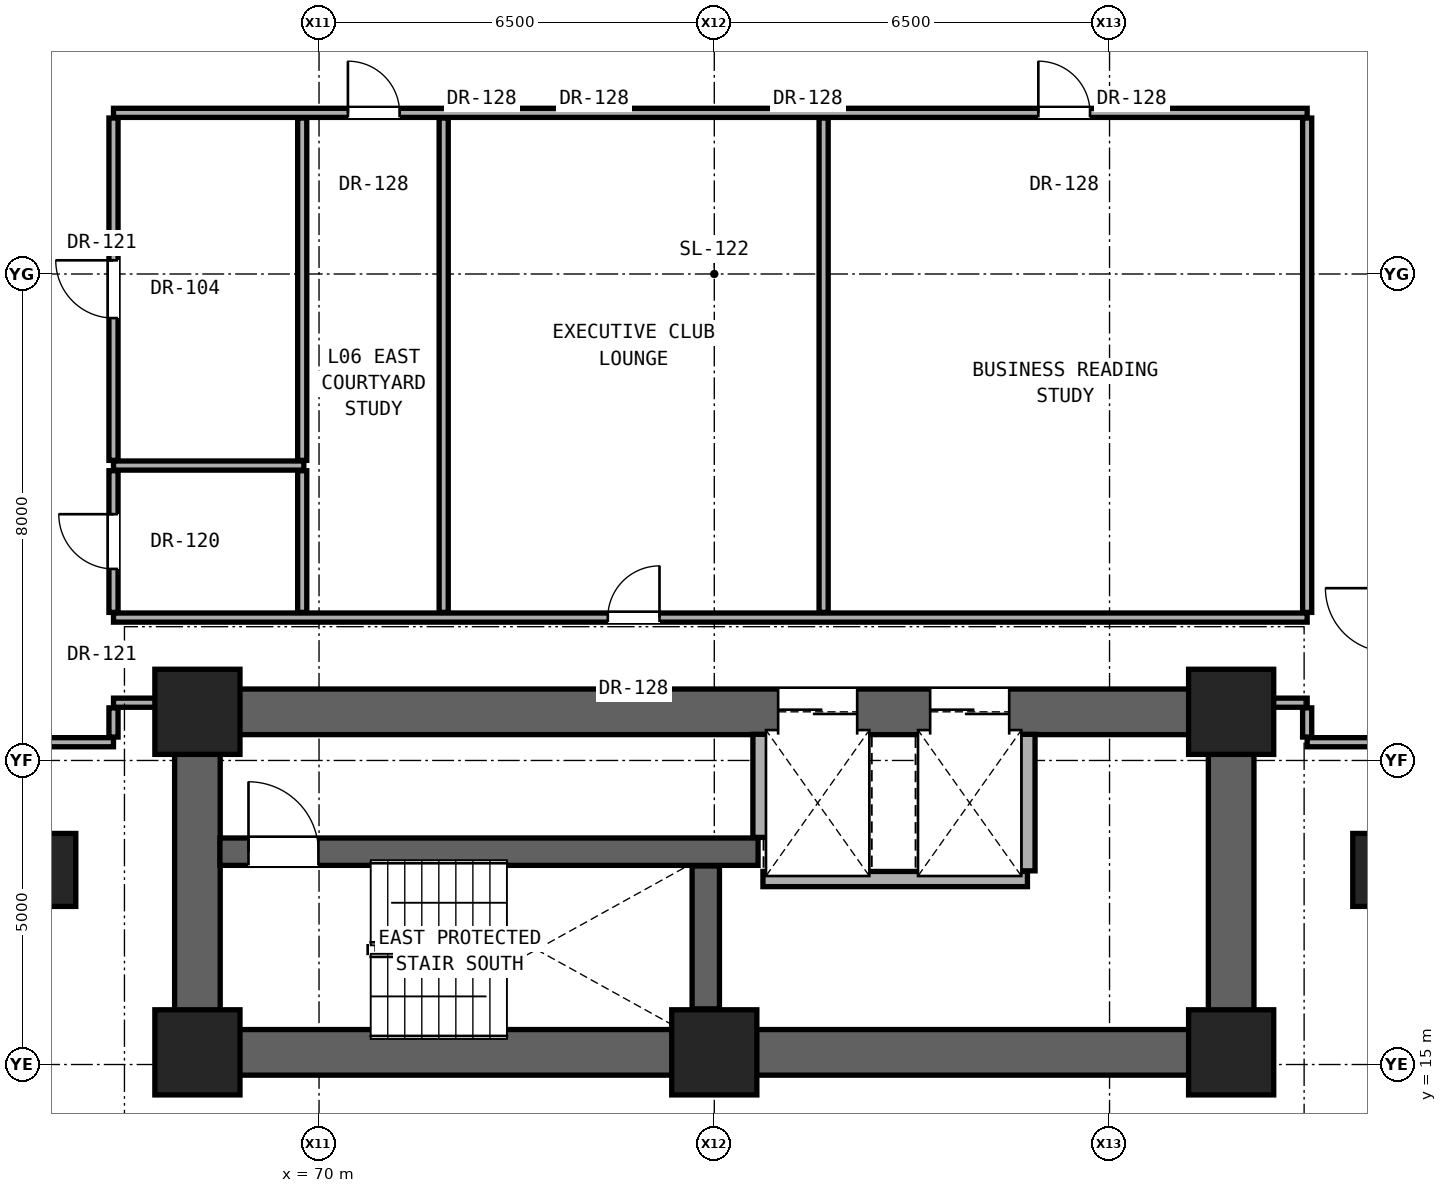
"""IFC4 building model, lengths in metres.
Left out: names, types, materials, properties, quantities, classifications, styles, units other than length and angle.
Written with IfcOpenShell. Run it as: python <this file> out.ifc"""

import sys

from ifc_helpers import new_model, si_unit, direction, frame, frame_2d, origin, origin_2d, place, context, subcontext, project, spatial, rectangle, extrude, element, fill, save


model = new_model("IFC4")
c1 = context("Model", 3, precision=1e-05, world=origin(), true_north=direction((0.0, 1.0)))
c2 = subcontext(c1, "Body", "Model", "MODEL_VIEW")
j1 = project(units=[si_unit("LENGTHUNIT", "METRE"), si_unit("PLANEANGLEUNIT", "RADIAN")], contexts=[c1])
p1 = place(None, origin())
s1 = spatial("IfcSite", under=j1, at=p1, CompositionType="ELEMENT")
p2 = place(p1, origin())
s2 = spatial("IfcBuilding", under=s1, at=p2, CompositionType="ELEMENT")
p3 = place(p2, frame((0.0, 0.0, 25.7)))
s3 = spatial("IfcBuildingStorey", under=s2, at=p3, CompositionType="ELEMENT", Elevation=25.7)
for number, where, z_axis, x_axis in (
    (1, (68.0, 15.2, 0.0), (0.0, 0.0, 1.0), (1.0, 0.0, 0.0)),
    (2, (76.5, 15.2, 0.0), (0.0, 0.0, 1.0), (1.0, 0.0, 0.0)),
    (3, (85.0, 15.2, 0.0), (0.0, 0.0, 1.0), (1.0, 0.0, 0.0)),
    (4, (68.0, 20.8, 0.0), (0.0, 0.0, 1.0), (1.0, 0.0, 0.0)),
    (5, (85.0, 20.8, 0.0), (0.0, 0.0, 1.0), (1.0, 0.0, 0.0)),
):
    element("IfcColumn", number, at=place(p3, frame(where, z_axis=z_axis, x_axis=x_axis)), inside=s3, PredefinedType="COLUMN", context=c2, shape_type="SweptSolid", body=[
        extrude(rectangle(XDim=1.4, YDim=1.4, at=origin_2d()), origin(), (0.0, 0.0, 1.0), 3.3),
    ])
for number, where, z_axis, x_axis in (
    (6, (65.6, 18.2, 0.0), (0.0, 0.0, 1.0), (1.0, 0.0, 0.0)),
    (7, (87.4, 18.2, 0.0), (0.0, 0.0, 1.0), (1.0, 0.0, 0.0)),
):
    element("IfcColumn", number, at=place(p3, frame(where, z_axis=z_axis, x_axis=x_axis)), inside=s3, PredefinedType="PILASTER", context=c2, shape_type="SweptSolid", body=[
        extrude(rectangle(XDim=0.8, YDim=1.2, at=origin_2d()), origin(), (0.0, 0.0, 1.0), 3.3),
    ])
p4 = place(p3, frame((68.0, 15.2, 0.0), z_axis=(0.0, 0.0, 1.0), x_axis=(1.0, 0.0, 0.0)))
e8 = element("IfcWall", 8, at=p4, inside=s3, PredefinedType="SHEAR", context=c2, shape_type="SweptSolid", body=[
    extrude(rectangle(XDim=17.0, YDim=0.75, at=frame_2d((8.5, 0.0))), origin(), (0.0, 0.0, 1.0), 3.06),
])
for number, where, z_axis, x_axis in (
    (9, (68.0, 15.2, 0.0), (0.0, 0.0, 1.0), (0.0, 1.0, 0.0)),
    (10, (85.0, 15.2, 0.0), (0.0, 0.0, 1.0), (0.0, 1.0, 0.0)),
):
    element("IfcWall", number, at=place(p3, frame(where, z_axis=z_axis, x_axis=x_axis)), inside=s3, PredefinedType="SHEAR", context=c2, shape_type="SweptSolid", body=[
        extrude(rectangle(XDim=5.6, YDim=0.75, at=frame_2d((2.8, 0.0))), origin(), (0.0, 0.0, 1.0), 3.06),
    ])
p5 = place(p3, frame((68.0, 20.8, 0.0), z_axis=(0.0, 0.0, 1.0), x_axis=(1.0, 0.0, 0.0)))
e11 = element("IfcWall", 11, at=p5, inside=s3, PredefinedType="SHEAR", context=c2, shape_type="SweptSolid", body=[
    extrude(rectangle(XDim=17.0, YDim=0.75, at=frame_2d((8.5, 0.0))), origin(), (0.0, 0.0, 1.0), 3.06),
])
p6 = place(p5, frame((9.55, 0.0, 0.0)))
e12 = element("IfcOpeningElement", 12, at=p6, cuts=e11, PredefinedType="OPENING", context=c2, shape_type="SweptSolid", body=[
    extrude(rectangle(XDim=1.3, YDim=2.3, at=frame_2d((0.65, 1.15))), frame((0.0, 0.385, 0.0), z_axis=(0.0, -1.0, 0.0), x_axis=(1.0, 0.0, 0.0)), (0.0, 0.0, 1.0), 0.77),
])
p7 = place(p5, frame((12.05, 0.0, 0.0)))
e13 = element("IfcOpeningElement", 13, at=p7, cuts=e11, PredefinedType="OPENING", context=c2, shape_type="SweptSolid", body=[
    extrude(rectangle(XDim=1.3, YDim=2.3, at=frame_2d((0.65, 1.15))), frame((0.0, 0.385, 0.0), z_axis=(0.0, -1.0, 0.0), x_axis=(1.0, 0.0, 0.0)), (0.0, 0.0, 1.0), 0.77),
])
p8 = place(p3, frame((77.3, 18.05, 0.0), z_axis=(0.0, 0.0, 1.0), x_axis=(1.0, 0.0, 0.0)))
e14 = element("IfcWall", 14, at=p8, inside=s3, PredefinedType="SOLIDWALL", context=c2, shape_type="SweptSolid", body=[
    extrude(rectangle(XDim=4.35, YDim=0.25, at=frame_2d((2.175, 0.0))), origin(), (0.0, 0.0, 1.0), 3.06),
])
p9 = place(p3, frame((68.37, 18.5, 0.0), z_axis=(0.0, 0.0, 1.0), x_axis=(1.0, 0.0, 0.0)))
e15 = element("IfcWall", 15, at=p9, inside=s3, PredefinedType="SHEAR", context=c2, shape_type="SweptSolid", body=[
    extrude(rectangle(XDim=8.85, YDim=0.45, at=frame_2d((4.425, 0.0))), origin(), (0.0, 0.0, 1.0), 3.06),
])
p10 = place(p9, frame((0.47, 0.0, 0.0)))
e16 = element("IfcOpeningElement", 16, at=p10, cuts=e15, PredefinedType="OPENING", context=c2, shape_type="SweptSolid", body=[
    extrude(rectangle(XDim=1.15, YDim=2.2, at=frame_2d((0.575, 1.1))), frame((0.0, 0.235, 0.0), z_axis=(0.0, -1.0, 0.0), x_axis=(1.0, 0.0, 0.0)), (0.0, 0.0, 1.0), 0.47),
])
p11 = place(p3, frame((65.25, 20.3, 0.0), z_axis=(0.0, 0.0, 1.0), x_axis=(1.0, 0.0, 0.0)))
e17 = element("IfcWall", 17, at=p11, inside=s3, PredefinedType="PARTITIONING", context=c2, shape_type="SweptSolid", body=[
    extrude(rectangle(XDim=1.37, YDim=0.15, at=frame_2d((0.685, 0.0))), origin(), (0.0, 0.0, 1.0), 3.06),
])
p12 = place(p3, frame((86.25, 20.3, 0.0), z_axis=(0.0, 0.0, 1.0), x_axis=(1.0, 0.0, 0.0)))
e18 = element("IfcWall", 18, at=p12, inside=s3, PredefinedType="PARTITIONING", context=c2, shape_type="SweptSolid", body=[
    extrude(rectangle(XDim=1.35, YDim=0.15, at=frame_2d((0.675, 0.0))), origin(), (0.0, 0.0, 1.0), 3.06),
])
p13 = place(p3, frame((66.62, 20.95, 0.0), z_axis=(0.0, 0.0, 1.0), x_axis=(1.0, 0.0, 0.0)))
e19 = element("IfcWall", 19, at=p13, inside=s3, PredefinedType="PARTITIONING", context=c2, shape_type="SweptSolid", body=[
    extrude(rectangle(XDim=1.01, YDim=0.15, at=frame_2d((0.505, 0.0))), origin(), (0.0, 0.0, 1.0), 2.452),
])
p14 = place(p3, frame((85.37, 20.95, 0.0), z_axis=(0.0, 0.0, 1.0), x_axis=(1.0, 0.0, 0.0)))
e20 = element("IfcWall", 20, at=p14, inside=s3, PredefinedType="PARTITIONING", context=c2, shape_type="SweptSolid", body=[
    extrude(rectangle(XDim=0.88, YDim=0.15, at=frame_2d((0.44, 0.0))), origin(), (0.0, 0.0, 1.0), 2.452),
])
p15 = place(p3, frame((66.62, 22.35, 0.0), z_axis=(0.0, 0.0, 1.0), x_axis=(1.0, 0.0, 0.0)))
e21 = element("IfcWall", 21, at=p15, inside=s3, PredefinedType="PARTITIONING", context=c2, shape_type="SweptSolid", body=[
    extrude(rectangle(XDim=19.63, YDim=0.15, at=frame_2d((9.815, 0.0))), origin(), (0.0, 0.0, 1.0), 2.125),
])
p16 = place(p15, frame((8.129, 0.0, 0.0)))
e22 = element("IfcOpeningElement", 22, at=p16, cuts=e21, PredefinedType="OPENING", context=c2, shape_type="SweptSolid", body=[
    extrude(rectangle(XDim=0.85, YDim=2.01, at=frame_2d((0.425, 1.005))), frame((0.0, 0.085, 0.0), z_axis=(0.0, -1.0, 0.0), x_axis=(1.0, 0.0, 0.0)), (0.0, 0.0, 1.0), 0.17),
])
p17 = place(p3, frame((66.62, 24.85, 0.0), z_axis=(0.0, 0.0, 1.0), x_axis=(1.0, 0.0, 0.0)))
e23 = element("IfcWall", 23, at=p17, inside=s3, PredefinedType="PARTITIONING", context=c2, shape_type="SweptSolid", body=[
    extrude(rectangle(XDim=3.13, YDim=0.15, at=frame_2d((1.565, 0.0))), origin(), (0.0, 0.0, 1.0), 2.125),
])
p18 = place(p3, frame((66.62, 30.65, 0.0), z_axis=(0.0, 0.0, 1.0), x_axis=(1.0, 0.0, 0.0)))
e24 = element("IfcWall", 24, at=p18, inside=s3, PredefinedType="PARTITIONING", context=c2, shape_type="SweptSolid", body=[
    extrude(rectangle(XDim=19.63, YDim=0.15, at=frame_2d((9.815, 0.0))), origin(), (0.0, 0.0, 1.0), 2.125),
])
p19 = place(p18, frame((3.855, 0.0, 0.0)))
e25 = element("IfcOpeningElement", 25, at=p19, cuts=e24, PredefinedType="OPENING", context=c2, shape_type="SweptSolid", body=[
    extrude(rectangle(XDim=0.85, YDim=2.01, at=frame_2d((0.425, 1.005))), frame((0.0, 0.085, 0.0), z_axis=(0.0, -1.0, 0.0), x_axis=(1.0, 0.0, 0.0)), (0.0, 0.0, 1.0), 0.17),
])
p20 = place(p18, frame((15.209, 0.0, 0.0)))
e26 = element("IfcOpeningElement", 26, at=p20, cuts=e24, PredefinedType="OPENING", context=c2, shape_type="SweptSolid", body=[
    extrude(rectangle(XDim=0.85, YDim=2.01, at=frame_2d((0.425, 1.005))), frame((0.0, 0.085, 0.0), z_axis=(0.0, -1.0, 0.0), x_axis=(1.0, 0.0, 0.0)), (0.0, 0.0, 1.0), 0.17),
])
p21 = place(p3, frame((66.62, 20.385, 0.0), z_axis=(0.0, 0.0, 1.0), x_axis=(0.0, 1.0, 0.0)))
e27 = element("IfcWall", 27, at=p21, inside=s3, PredefinedType="PARTITIONING", context=c2, shape_type="SweptSolid", body=[
    extrude(rectangle(XDim=0.48, YDim=0.15, at=frame_2d((0.24, 0.0))), origin(), (0.0, 0.0, 1.0), 2.452),
])
p22 = place(p3, frame((66.62, 22.435, 0.0), z_axis=(0.0, 0.0, 1.0), x_axis=(0.0, 1.0, 0.0)))
e28 = element("IfcWall", 28, at=p22, inside=s3, PredefinedType="PARTITIONING", context=c2, shape_type="SweptSolid", body=[
    extrude(rectangle(XDim=2.33, YDim=0.15, at=frame_2d((1.165, 0.0))), origin(), (0.0, 0.0, 1.0), 3.06),
])
p23 = place(p22, frame((0.715, 0.0, 0.0)))
e29 = element("IfcOpeningElement", 29, at=p23, cuts=e28, PredefinedType="OPENING", context=c2, shape_type="SweptSolid", body=[
    extrude(rectangle(XDim=0.9, YDim=2.1, at=frame_2d((0.45, 1.05))), frame((0.0, 0.085, 0.0), z_axis=(0.0, -1.0, 0.0), x_axis=(1.0, 0.0, 0.0)), (0.0, 0.0, 1.0), 0.17),
])
p24 = place(p3, frame((66.62, 24.935, 0.0), z_axis=(0.0, 0.0, 1.0), x_axis=(0.0, 1.0, 0.0)))
e30 = element("IfcWall", 30, at=p24, inside=s3, PredefinedType="PARTITIONING", context=c2, shape_type="SweptSolid", body=[
    extrude(rectangle(XDim=5.63, YDim=0.15, at=frame_2d((2.815, 0.0))), origin(), (0.0, 0.0, 1.0), 2.279),
])
p25 = place(p24, frame((2.34, 0.0, 0.0)))
e31 = element("IfcOpeningElement", 31, at=p25, cuts=e30, PredefinedType="OPENING", context=c2, shape_type="SweptSolid", body=[
    extrude(rectangle(XDim=0.95, YDim=2.15, at=frame_2d((0.475, 1.075))), frame((0.0, 0.085, 0.0), z_axis=(0.0, -1.0, 0.0), x_axis=(1.0, 0.0, 0.0)), (0.0, 0.0, 1.0), 0.17),
])
p26 = place(p3, frame((69.723, 22.435, 0.0), z_axis=(0.0, 0.0, 1.0), x_axis=(0.0, 1.0, 0.0)))
e32 = element("IfcWall", 32, at=p26, inside=s3, PredefinedType="PARTITIONING", context=c2, shape_type="SweptSolid", body=[
    extrude(rectangle(XDim=2.33, YDim=0.15, at=frame_2d((1.165, 0.0))), origin(), (0.0, 0.0, 1.0), 3.06),
])
p27 = place(p3, frame((69.723, 24.935, 0.0), z_axis=(0.0, 0.0, 1.0), x_axis=(0.0, 1.0, 0.0)))
e33 = element("IfcWall", 33, at=p27, inside=s3, PredefinedType="PARTITIONING", context=c2, shape_type="SweptSolid", body=[
    extrude(rectangle(XDim=5.63, YDim=0.15, at=frame_2d((2.815, 0.0))), origin(), (0.0, 0.0, 1.0), 2.125),
])
p28 = place(p3, frame((72.05, 22.435, 0.0), z_axis=(0.0, 0.0, 1.0), x_axis=(0.0, 1.0, 0.0)))
e34 = element("IfcWall", 34, at=p28, inside=s3, PredefinedType="PARTITIONING", context=c2, shape_type="SweptSolid", body=[
    extrude(rectangle(XDim=8.13, YDim=0.15, at=frame_2d((4.065, 0.0))), origin(), (0.0, 0.0, 1.0), 2.125),
])
p29 = place(p3, frame((76.36, 15.915, 0.0), z_axis=(0.0, 0.0, 1.0), x_axis=(0.0, 1.0, 0.0)))
e35 = element("IfcWall", 35, at=p29, inside=s3, PredefinedType="SHEAR", context=c2, shape_type="SweptSolid", body=[
    extrude(rectangle(XDim=2.35, YDim=0.45, at=frame_2d((1.175, 0.0))), origin(), (0.0, 0.0, 1.0), 3.06),
])
p30 = place(p3, frame((77.26, 18.735, 0.0), z_axis=(0.0, 0.0, 1.0), x_axis=(0.0, 1.0, 0.0)))
e36 = element("IfcWall", 36, at=p30, inside=s3, PredefinedType="SOLIDWALL", context=c2, shape_type="SweptSolid", body=[
    extrude(rectangle(XDim=1.695, YDim=0.25, at=frame_2d((0.847, 0.0))), origin(), (0.0, 0.0, 1.0), 3.06),
])
p31 = place(p3, frame((78.298, 22.435, 0.0), z_axis=(0.0, 0.0, 1.0), x_axis=(0.0, 1.0, 0.0)))
e37 = element("IfcWall", 37, at=p31, inside=s3, PredefinedType="PARTITIONING", context=c2, shape_type="SweptSolid", body=[
    extrude(rectangle(XDim=8.13, YDim=0.15, at=frame_2d((4.065, 0.0))), origin(), (0.0, 0.0, 1.0), 2.125),
])
p32 = place(p3, frame((81.65, 18.185, 0.0), z_axis=(0.0, 0.0, 1.0), x_axis=(0.0, 1.0, 0.0)))
e38 = element("IfcWall", 38, at=p32, inside=s3, PredefinedType="SOLIDWALL", context=c2, shape_type="SweptSolid", body=[
    extrude(rectangle(XDim=2.245, YDim=0.25, at=frame_2d((1.123, 0.0))), origin(), (0.0, 0.0, 1.0), 3.06),
])
p33 = place(p3, frame((86.25, 20.385, 0.0), z_axis=(0.0, 0.0, 1.0), x_axis=(0.0, 1.0, 0.0)))
e39 = element("IfcWall", 39, at=p33, inside=s3, PredefinedType="PARTITIONING", context=c2, shape_type="SweptSolid", body=[
    extrude(rectangle(XDim=0.48, YDim=0.15, at=frame_2d((0.24, 0.0))), origin(), (0.0, 0.0, 1.0), 2.452),
])
p34 = place(p3, frame((86.25, 22.435, 0.0), z_axis=(0.0, 0.0, 1.0), x_axis=(0.0, 1.0, 0.0)))
e40 = element("IfcWall", 40, at=p34, inside=s3, PredefinedType="PARTITIONING", context=c2, shape_type="SweptSolid", body=[
    extrude(rectangle(XDim=8.13, YDim=0.15, at=frame_2d((4.065, 0.0))), origin(), (0.0, 0.0, 1.0), 2.279),
])
p35 = place(p10, origin())
e41 = element("IfcDoor", 41, at=p35, inside=s3, OperationType="SINGLE_SWING_LEFT", PredefinedType="DOOR", context=c2, shape_type="SweptSolid", body=[
    extrude(rectangle(XDim=1.15, YDim=2.2, at=frame_2d((0.575, 1.1))), frame((0.0, 0.025, 0.0), z_axis=(0.0, -1.0, 0.0), x_axis=(1.0, 0.0, 0.0)), (0.0, 0.0, 1.0), 0.05),
])
fill(e16, e41)
p36 = place(p23, origin())
e42 = element("IfcDoor", 42, at=p36, inside=s3, OperationType="SINGLE_SWING_RIGHT", PredefinedType="DOOR", context=c2, shape_type="SweptSolid", body=[
    extrude(rectangle(XDim=0.9, YDim=2.1, at=frame_2d((0.45, 1.05))), frame((0.0, 0.025, 0.0), z_axis=(0.0, -1.0, 0.0), x_axis=(1.0, 0.0, 0.0)), (0.0, 0.0, 1.0), 0.05),
])
fill(e29, e42)
p37 = place(p25, origin())
e43 = element("IfcDoor", 43, at=p37, inside=s3, OperationType="SINGLE_SWING_RIGHT", PredefinedType="DOOR", context=c2, shape_type="SweptSolid", body=[
    extrude(rectangle(XDim=0.95, YDim=2.15, at=frame_2d((0.475, 1.075))), frame((0.0, 0.025, 0.0), z_axis=(0.0, -1.0, 0.0), x_axis=(1.0, 0.0, 0.0)), (0.0, 0.0, 1.0), 0.05),
])
fill(e31, e43)
p38 = place(p19, origin())
e44 = element("IfcDoor", 44, at=p38, inside=s3, OperationType="SINGLE_SWING_LEFT", PredefinedType="DOOR", context=c2, shape_type="SweptSolid", body=[
    extrude(rectangle(XDim=0.85, YDim=2.01, at=frame_2d((0.425, 1.005))), frame((0.0, 0.025, 0.0), z_axis=(0.0, -1.0, 0.0), x_axis=(1.0, 0.0, 0.0)), (0.0, 0.0, 1.0), 0.05),
])
fill(e25, e44)
p39 = place(p16, origin())
e45 = element("IfcDoor", 45, at=p39, inside=s3, OperationType="SINGLE_SWING_RIGHT", PredefinedType="DOOR", context=c2, shape_type="SweptSolid", body=[
    extrude(rectangle(XDim=0.85, YDim=2.01, at=frame_2d((0.425, 1.005))), frame((0.0, 0.025, 0.0), z_axis=(0.0, -1.0, 0.0), x_axis=(1.0, 0.0, 0.0)), (0.0, 0.0, 1.0), 0.05),
])
fill(e22, e45)
p40 = place(p20, origin())
e46 = element("IfcDoor", 46, at=p40, inside=s3, OperationType="SINGLE_SWING_LEFT", PredefinedType="DOOR", context=c2, shape_type="SweptSolid", body=[
    extrude(rectangle(XDim=0.85, YDim=2.01, at=frame_2d((0.425, 1.005))), frame((0.0, 0.025, 0.0), z_axis=(0.0, -1.0, 0.0), x_axis=(1.0, 0.0, 0.0)), (0.0, 0.0, 1.0), 0.05),
])
fill(e26, e46)
p41 = place(p6, origin())
e47 = element("IfcDoor", 47, at=p41, inside=s3, OperationType="DOUBLE_DOOR_SLIDING", PredefinedType="DOOR", context=c2, shape_type="SweptSolid", body=[
    extrude(rectangle(XDim=1.3, YDim=2.3, at=frame_2d((0.65, 1.15))), frame((0.0, 0.025, 0.0), z_axis=(0.0, -1.0, 0.0), x_axis=(1.0, 0.0, 0.0)), (0.0, 0.0, 1.0), 0.05),
])
fill(e12, e47)
p42 = place(p7, origin())
e48 = element("IfcDoor", 48, at=p42, inside=s3, OperationType="DOUBLE_DOOR_SLIDING", PredefinedType="DOOR", context=c2, shape_type="SweptSolid", body=[
    extrude(rectangle(XDim=1.3, YDim=2.3, at=frame_2d((0.65, 1.15))), frame((0.0, 0.025, 0.0), z_axis=(0.0, -1.0, 0.0), x_axis=(1.0, 0.0, 0.0)), (0.0, 0.0, 1.0), 0.05),
])
fill(e13, e48)
save(model, sys.argv[1])
